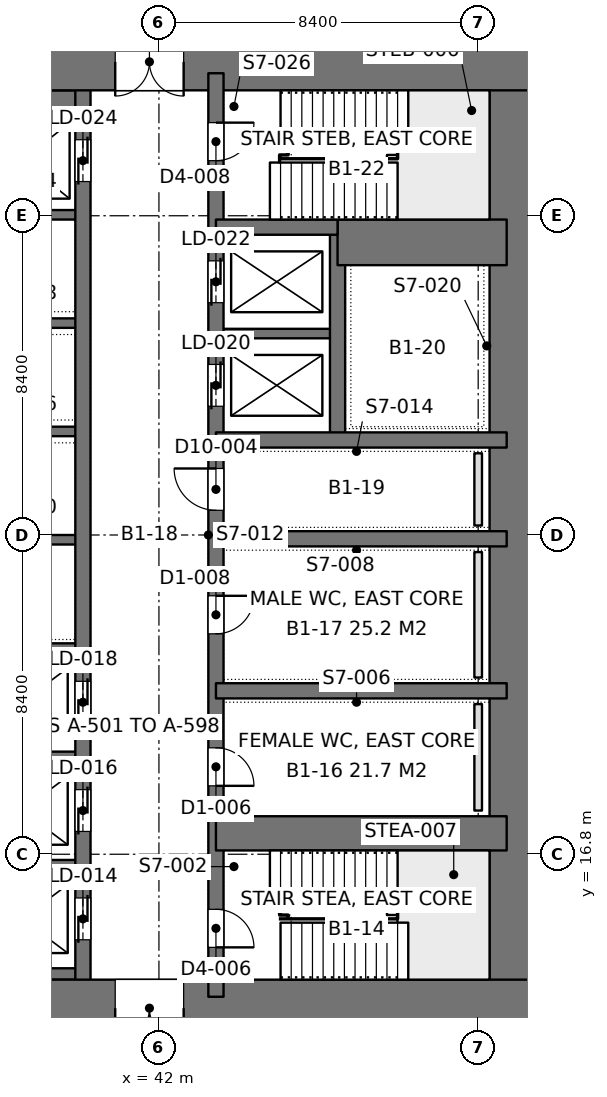
"""IFC4 building model, lengths in metres.
Left out: names, types, materials, properties, quantities, classifications, styles, units other than length and angle.
Written with IfcOpenShell. Run it as: python <this file> out.ifc"""

import sys

from ifc_helpers import new_model, si_unit, direction, frame, frame_2d, origin, place, context, subcontext, project, spatial, rectangle, extrude, element, fill, save


model = new_model("IFC4")
c1 = context("Model", 3, precision=1e-05, world=origin(), true_north=direction((0.0, 1.0)))
c2 = subcontext(c1, "Body", "Model", "MODEL_VIEW")
j1 = project(units=[si_unit("LENGTHUNIT", "METRE"), si_unit("PLANEANGLEUNIT", "RADIAN")], contexts=[c1])
p1 = place(None, origin())
s1 = spatial("IfcSite", under=j1, at=p1, CompositionType="ELEMENT")
p2 = place(p1, origin())
s2 = spatial("IfcBuilding", under=s1, at=p2, CompositionType="ELEMENT")
p3 = place(p2, frame((0.0, 0.0, -4.2)))
s3 = spatial("IfcBuildingStorey", under=s2, at=p3, CompositionType="ELEMENT", Elevation=-4.2)
p4 = place(p3, frame((33.0, 12.75, 0.0), z_axis=(0.0, 0.0, 1.0), x_axis=(1.0, 0.0, 0.0)))
e1 = element("IfcWall", 1, at=p4, inside=s3, PredefinedType="SHEAR", context=c2, shape_type="SweptSolid", body=[
    extrude(rectangle(XDim=19.2, YDim=1.5, at=frame_2d((9.6, 0.0))), origin(), (0.0, 0.0, 1.0), 4.2),
])
p5 = place(p4, frame((7.85, 0.0, 0.0)))
e2 = element("IfcOpeningElement", 2, at=p5, cuts=e1, PredefinedType="OPENING", context=c2, shape_type="SweptSolid", body=[
    extrude(rectangle(XDim=1.8, YDim=2.4, at=frame_2d((0.9, 1.2))), frame((0.0, 0.76, 0.0), z_axis=(0.0, -1.0, 0.0), x_axis=(1.0, 0.0, 0.0)), (0.0, 0.0, 1.0), 1.52),
])
p6 = place(p3, frame((33.0, 37.65, 0.0), z_axis=(0.0, 0.0, 1.0), x_axis=(1.0, 0.0, 0.0)))
e3 = element("IfcWall", 3, at=p6, inside=s3, PredefinedType="SHEAR", context=c2, shape_type="SweptSolid", body=[
    extrude(rectangle(XDim=19.2, YDim=1.5, at=frame_2d((9.6, 0.0))), origin(), (0.0, 0.0, 1.0), 4.2),
])
p7 = place(p6, frame((7.85, 0.0, 0.0)))
e4 = element("IfcOpeningElement", 4, at=p7, cuts=e3, PredefinedType="OPENING", context=c2, shape_type="SweptSolid", body=[
    extrude(rectangle(XDim=1.8, YDim=2.4, at=frame_2d((0.9, 1.2))), frame((0.0, 0.76, 0.0), z_axis=(0.0, -1.0, 0.0), x_axis=(1.0, 0.0, 0.0)), (0.0, 0.0, 1.0), 1.52),
])
p8 = place(p3, frame((51.45, 12.75, 0.0), z_axis=(0.0, 0.0, 1.0), x_axis=(0.0, 1.0, 0.0)))
e5 = element("IfcWall", 5, at=p8, inside=s3, PredefinedType="SHEAR", context=c2, shape_type="SweptSolid", body=[
    extrude(rectangle(XDim=24.9, YDim=1.5, at=frame_2d((12.45, 0.0))), origin(), (0.0, 0.0, 1.0), 4.2),
])
p9 = place(p3, frame((43.5, 13.05, 0.0), z_axis=(0.0, 0.0, 1.0), x_axis=(0.0, 1.0, 0.0)))
e6 = element("IfcWall", 6, at=p9, inside=s3, PredefinedType="SHEAR", context=c2, shape_type="SweptSolid", body=[
    extrude(rectangle(XDim=24.3, YDim=0.4, at=frame_2d((12.15, 0.0))), origin(), (0.0, 0.0, 1.0), 4.2),
])
p10 = place(p9, frame((1.3, 0.0, 0.0)))
e7 = element("IfcOpeningElement", 7, at=p10, cuts=e6, PredefinedType="OPENING", context=c2, shape_type="SweptSolid", body=[
    extrude(rectangle(XDim=1.0, YDim=2.2, at=frame_2d((0.5, 1.1))), frame((0.0, 0.21, 0.0), z_axis=(0.0, -1.0, 0.0), x_axis=(1.0, 0.0, 0.0)), (0.0, 0.0, 1.0), 0.42),
])
p11 = place(p9, frame((22.0, 0.0, 0.0)))
e8 = element("IfcOpeningElement", 8, at=p11, cuts=e6, PredefinedType="OPENING", context=c2, shape_type="SweptSolid", body=[
    extrude(rectangle(XDim=1.0, YDim=2.2, at=frame_2d((0.5, 1.1))), frame((0.0, 0.21, 0.0), z_axis=(0.0, -1.0, 0.0), x_axis=(1.0, 0.0, 0.0)), (0.0, 0.0, 1.0), 0.42),
])
p12 = place(p9, frame((5.55, 0.0, 0.0)))
e9 = element("IfcOpeningElement", 9, at=p12, cuts=e6, PredefinedType="OPENING", context=c2, shape_type="SweptSolid", body=[
    extrude(rectangle(XDim=1.0, YDim=2.2, at=frame_2d((0.5, 1.1))), frame((0.0, 0.21, 0.0), z_axis=(0.0, -1.0, 0.0), x_axis=(1.0, 0.0, 0.0)), (0.0, 0.0, 1.0), 0.42),
])
p13 = place(p9, frame((9.55, 0.0, 0.0)))
e10 = element("IfcOpeningElement", 10, at=p13, cuts=e6, PredefinedType="OPENING", context=c2, shape_type="SweptSolid", body=[
    extrude(rectangle(XDim=1.0, YDim=2.2, at=frame_2d((0.5, 1.1))), frame((0.0, 0.21, 0.0), z_axis=(0.0, -1.0, 0.0), x_axis=(1.0, 0.0, 0.0)), (0.0, 0.0, 1.0), 0.42),
])
p14 = place(p9, frame((12.8, 0.0, 0.0)))
e11 = element("IfcOpeningElement", 11, at=p14, cuts=e6, PredefinedType="OPENING", context=c2, shape_type="SweptSolid", body=[
    extrude(rectangle(XDim=1.1, YDim=2.2, at=frame_2d((0.55, 1.1))), frame((0.0, 0.21, 0.0), z_axis=(0.0, -1.0, 0.0), x_axis=(1.0, 0.0, 0.0)), (0.0, 0.0, 1.0), 0.42),
])
p15 = place(p9, frame((15.538, 0.0, 0.0)))
e12 = element("IfcOpeningElement", 12, at=p15, cuts=e6, PredefinedType="OPENING", context=c2, shape_type="SweptSolid", body=[
    extrude(rectangle(XDim=1.1, YDim=2.2, at=frame_2d((0.55, 1.1))), frame((0.0, 0.21, 0.0), z_axis=(0.0, -1.0, 0.0), x_axis=(1.0, 0.0, 0.0)), (0.0, 0.0, 1.0), 0.42),
])
p16 = place(p9, frame((18.262, 0.0, 0.0)))
e13 = element("IfcOpeningElement", 13, at=p16, cuts=e6, PredefinedType="OPENING", context=c2, shape_type="SweptSolid", body=[
    extrude(rectangle(XDim=1.1, YDim=2.2, at=frame_2d((0.55, 1.1))), frame((0.0, 0.21, 0.0), z_axis=(0.0, -1.0, 0.0), x_axis=(1.0, 0.0, 0.0)), (0.0, 0.0, 1.0), 0.42),
])
p17 = place(p3, frame((40.0, 13.05, 0.0), z_axis=(0.0, 0.0, 1.0), x_axis=(0.0, 1.0, 0.0)))
e14 = element("IfcWall", 14, at=p17, inside=s3, PredefinedType="SHEAR", context=c2, shape_type="SweptSolid", body=[
    extrude(rectangle(XDim=24.3, YDim=0.4, at=frame_2d((12.15, 0.0))), origin(), (0.0, 0.0, 1.0), 4.2),
])
p18 = place(p17, frame((1.5, 0.0, 0.0)))
e15 = element("IfcOpeningElement", 15, at=p18, cuts=e14, PredefinedType="OPENING", context=c2, shape_type="SweptSolid", body=[
    extrude(rectangle(XDim=1.1, YDim=2.2, at=frame_2d((0.55, 1.1))), frame((0.0, 0.21, 0.0), z_axis=(0.0, -1.0, 0.0), x_axis=(1.0, 0.0, 0.0)), (0.0, 0.0, 1.0), 0.42),
])
p19 = place(p17, frame((4.35, 0.0, 0.0)))
e16 = element("IfcOpeningElement", 16, at=p19, cuts=e14, PredefinedType="OPENING", context=c2, shape_type="SweptSolid", body=[
    extrude(rectangle(XDim=1.1, YDim=2.2, at=frame_2d((0.55, 1.1))), frame((0.0, 0.21, 0.0), z_axis=(0.0, -1.0, 0.0), x_axis=(1.0, 0.0, 0.0)), (0.0, 0.0, 1.0), 0.42),
])
p20 = place(p17, frame((7.2, 0.0, 0.0)))
e17 = element("IfcOpeningElement", 17, at=p20, cuts=e14, PredefinedType="OPENING", context=c2, shape_type="SweptSolid", body=[
    extrude(rectangle(XDim=1.1, YDim=2.2, at=frame_2d((0.55, 1.1))), frame((0.0, 0.21, 0.0), z_axis=(0.0, -1.0, 0.0), x_axis=(1.0, 0.0, 0.0)), (0.0, 0.0, 1.0), 0.42),
])
p21 = place(p17, frame((21.45, 0.0, 0.0)))
e18 = element("IfcOpeningElement", 18, at=p21, cuts=e14, PredefinedType="OPENING", context=c2, shape_type="SweptSolid", body=[
    extrude(rectangle(XDim=1.1, YDim=2.2, at=frame_2d((0.55, 1.1))), frame((0.0, 0.21, 0.0), z_axis=(0.0, -1.0, 0.0), x_axis=(1.0, 0.0, 0.0)), (0.0, 0.0, 1.0), 0.42),
])
p22 = place(p3, frame((51.15, 17.35, 0.0), z_axis=(0.0, 0.0, 1.0), x_axis=(-1.0, 0.0, 0.0)))
e19 = element("IfcWall", 19, at=p22, inside=s3, PredefinedType="SHEAR", context=c2, shape_type="SweptSolid", body=[
    extrude(rectangle(XDim=7.65, YDim=0.9, at=frame_2d((3.825, 0.0))), origin(), (0.0, 0.0, 1.0), 4.2),
])
for number, where, z_axis, x_axis in (
    (20, (51.15, 21.1, 0.0), (0.0, 0.0, 1.0), (-1.0, 0.0, 0.0)),
    (21, (51.15, 25.1, 0.0), (0.0, 0.0, 1.0), (-1.0, 0.0, 0.0)),
    (22, (51.15, 27.7, 0.0), (0.0, 0.0, 1.0), (-1.0, 0.0, 0.0)),
):
    element("IfcWall", number, at=place(p3, frame(where, z_axis=z_axis, x_axis=x_axis)), inside=s3, PredefinedType="SHEAR", context=c2, shape_type="SweptSolid", body=[
        extrude(rectangle(XDim=7.65, YDim=0.4, at=frame_2d((3.825, 0.0))), origin(), (0.0, 0.0, 1.0), 4.2),
    ])
p23 = place(p3, frame((51.15, 32.9, 0.0), z_axis=(0.0, 0.0, 1.0), x_axis=(-1.0, 0.0, 0.0)))
e23 = element("IfcWall", 23, at=p23, inside=s3, PredefinedType="SHEAR", context=c2, shape_type="SweptSolid", body=[
    extrude(rectangle(XDim=4.45, YDim=1.2, at=frame_2d((2.225, 0.0))), origin(), (0.0, 0.0, 1.0), 4.2),
])
p24 = place(p3, frame((46.7, 33.3, 0.0), z_axis=(0.0, 0.0, 1.0), x_axis=(-1.0, 0.0, 0.0)))
e24 = element("IfcWall", 24, at=p24, inside=s3, PredefinedType="SHEAR", context=c2, shape_type="SweptSolid", body=[
    extrude(rectangle(XDim=3.2, YDim=0.4, at=frame_2d((1.6, 0.0))), origin(), (0.0, 0.0, 1.0), 4.2),
])
p25 = place(p3, frame((46.7, 27.7, 0.0), z_axis=(0.0, 0.0, 1.0), x_axis=(0.0, 1.0, 0.0)))
e25 = element("IfcWall", 25, at=p25, inside=s3, PredefinedType="SHEAR", context=c2, shape_type="SweptSolid", body=[
    extrude(rectangle(XDim=5.6, YDim=0.4, at=frame_2d((2.8, 0.0))), origin(), (0.0, 0.0, 1.0), 4.2),
])
p26 = place(p3, frame((46.7, 30.5, 0.0), z_axis=(0.0, 0.0, 1.0), x_axis=(-1.0, 0.0, 0.0)))
e26 = element("IfcWall", 26, at=p26, inside=s3, PredefinedType="SHEAR", context=c2, shape_type="SweptSolid", body=[
    extrude(rectangle(XDim=3.2, YDim=0.25, at=frame_2d((1.6, 0.0))), origin(), (0.0, 0.0, 1.0), 4.2),
])
p27 = place(p3, frame((40.0, 13.65, 0.0), z_axis=(0.0, 0.0, 1.0), x_axis=(-1.0, 0.0, 0.0)))
e27 = element("IfcWall", 27, at=p27, inside=s3, PredefinedType="SHEAR", context=c2, shape_type="SweptSolid", body=[
    extrude(rectangle(XDim=3.2, YDim=0.3, at=frame_2d((1.6, 0.0))), origin(), (0.0, 0.0, 1.0), 4.2),
])
for number, where, z_axis, x_axis in (
    (28, (40.0, 16.525, 0.0), (0.0, 0.0, 1.0), (-1.0, 0.0, 0.0)),
    (29, (40.0, 19.375, 0.0), (0.0, 0.0, 1.0), (-1.0, 0.0, 0.0)),
    (30, (40.0, 22.225, 0.0), (0.0, 0.0, 1.0), (-1.0, 0.0, 0.0)),
    (31, (40.0, 25.075, 0.0), (0.0, 0.0, 1.0), (-1.0, 0.0, 0.0)),
    (32, (40.0, 27.925, 0.0), (0.0, 0.0, 1.0), (-1.0, 0.0, 0.0)),
    (33, (40.0, 30.775, 0.0), (0.0, 0.0, 1.0), (-1.0, 0.0, 0.0)),
    (34, (40.0, 33.625, 0.0), (0.0, 0.0, 1.0), (-1.0, 0.0, 0.0)),
):
    element("IfcWall", number, at=place(p3, frame(where, z_axis=z_axis, x_axis=x_axis)), inside=s3, PredefinedType="SHEAR", context=c2, shape_type="SweptSolid", body=[
        extrude(rectangle(XDim=3.2, YDim=0.25, at=frame_2d((1.6, 0.0))), origin(), (0.0, 0.0, 1.0), 4.2),
    ])
p28 = place(p3, frame((40.0, 36.625, 0.0), z_axis=(0.0, 0.0, 1.0), x_axis=(-1.0, 0.0, 0.0)))
e35 = element("IfcWall", 35, at=p28, inside=s3, PredefinedType="SHEAR", context=c2, shape_type="SweptSolid", body=[
    extrude(rectangle(XDim=3.2, YDim=0.55, at=frame_2d((1.6, 0.0))), origin(), (0.0, 0.0, 1.0), 4.2),
])
p29 = place(p3, frame((51.15, 9.049, 0.0), z_axis=(0.0, 0.0, 1.0), x_axis=(0.0, 1.0, 0.0)))
e36 = element("IfcWall", 36, at=p29, inside=s3, PredefinedType="PARTITIONING", context=c2, shape_type="SweptSolid", body=[
    extrude(rectangle(XDim=3.531, YDim=0.25, at=frame_2d((1.766, 0.0))), origin(), (0.0, 0.0, 1.0), 3.8),
])
p30 = place(p29, frame((1.001, 0.0, 0.0)))
e37 = element("IfcOpeningElement", 37, at=p30, cuts=e36, PredefinedType="OPENING", context=c2, shape_type="SweptSolid", body=[
    extrude(rectangle(XDim=0.9, YDim=2.2, at=frame_2d((0.45, 1.1))), frame((0.0, 0.135, 0.0), z_axis=(0.0, -1.0, 0.0), x_axis=(1.0, 0.0, 0.0)), (0.0, 0.0, 1.0), 0.27),
])
p31 = place(p3, frame((51.15, 37.82, 0.0), z_axis=(0.0, 0.0, 1.0), x_axis=(0.0, 1.0, 0.0)))
e38 = element("IfcWall", 38, at=p31, inside=s3, PredefinedType="PARTITIONING", context=c2, shape_type="SweptSolid", body=[
    extrude(rectangle(XDim=3.531, YDim=0.25, at=frame_2d((1.766, 0.0))), origin(), (0.0, 0.0, 1.0), 3.8),
])
p32 = place(p3, frame((50.4, 17.95, 0.0), z_axis=(0.0, 0.0, 1.0), x_axis=(0.0, 1.0, 0.0)))
e39 = element("IfcWall", 39, at=p32, inside=s3, PredefinedType="PLUMBINGWALL", context=c2, shape_type="SweptSolid", body=[
    extrude(rectangle(XDim=2.8, YDim=0.2, at=frame_2d((1.4, 0.0))), origin(), (0.0, 0.0, 1.0), 1.2),
])
p33 = place(p3, frame((50.4, 21.45, 0.0), z_axis=(0.0, 0.0, 1.0), x_axis=(0.0, 1.0, 0.0)))
e40 = element("IfcWall", 40, at=p33, inside=s3, PredefinedType="PLUMBINGWALL", context=c2, shape_type="SweptSolid", body=[
    extrude(rectangle(XDim=3.3, YDim=0.2, at=frame_2d((1.65, 0.0))), origin(), (0.0, 0.0, 1.0), 1.2),
])
p34 = place(p3, frame((50.4, 25.45, 0.0), z_axis=(0.0, 0.0, 1.0), x_axis=(0.0, 1.0, 0.0)))
e41 = element("IfcWall", 41, at=p34, inside=s3, PredefinedType="PLUMBINGWALL", context=c2, shape_type="SweptSolid", body=[
    extrude(rectangle(XDim=1.9, YDim=0.2, at=frame_2d((0.95, 0.0))), origin(), (0.0, 0.0, 1.0), 1.2),
])
p35 = place(p5, frame((1.8, 0.0, 0.0), z_axis=(0.0, 0.0, 1.0), x_axis=(-1.0, 0.0, 0.0)))
e42 = element("IfcDoor", 42, at=p35, inside=s3, OperationType="DOUBLE_DOOR_SINGLE_SWING", PredefinedType="DOOR", context=c2, shape_type="SweptSolid", body=[
    extrude(rectangle(XDim=1.8, YDim=2.4, at=frame_2d((0.9, 1.2))), frame((0.0, 0.025, 0.0), z_axis=(0.0, -1.0, 0.0), x_axis=(1.0, 0.0, 0.0)), (0.0, 0.0, 1.0), 0.05),
])
fill(e2, e42)
p36 = place(p7, frame((1.8, 0.0, 0.0), z_axis=(0.0, 0.0, 1.0), x_axis=(-1.0, 0.0, 0.0)))
e43 = element("IfcDoor", 43, at=p36, inside=s3, OperationType="DOUBLE_DOOR_SINGLE_SWING", PredefinedType="DOOR", context=c2, shape_type="SweptSolid", body=[
    extrude(rectangle(XDim=1.8, YDim=2.4, at=frame_2d((0.9, 1.2))), frame((0.0, 0.025, 0.0), z_axis=(0.0, -1.0, 0.0), x_axis=(1.0, 0.0, 0.0)), (0.0, 0.0, 1.0), 0.05),
])
fill(e4, e43)
p37 = place(p10, frame((1.0, 0.0, 0.0), z_axis=(0.0, 0.0, 1.0), x_axis=(-1.0, 0.0, 0.0)))
e44 = element("IfcDoor", 44, at=p37, inside=s3, OperationType="SINGLE_SWING_RIGHT", PredefinedType="DOOR", context=c2, shape_type="SweptSolid", body=[
    extrude(rectangle(XDim=1.0, YDim=2.2, at=frame_2d((0.5, 1.1))), frame((0.0, 0.025, 0.0), z_axis=(0.0, -1.0, 0.0), x_axis=(1.0, 0.0, 0.0)), (0.0, 0.0, 1.0), 0.05),
])
fill(e7, e44)
p38 = place(p11, frame((1.0, 0.0, 0.0), z_axis=(0.0, 0.0, 1.0), x_axis=(-1.0, 0.0, 0.0)))
e45 = element("IfcDoor", 45, at=p38, inside=s3, OperationType="SINGLE_SWING_LEFT", PredefinedType="DOOR", context=c2, shape_type="SweptSolid", body=[
    extrude(rectangle(XDim=1.0, YDim=2.2, at=frame_2d((0.5, 1.1))), frame((0.0, 0.025, 0.0), z_axis=(0.0, -1.0, 0.0), x_axis=(1.0, 0.0, 0.0)), (0.0, 0.0, 1.0), 0.05),
])
fill(e8, e45)
p39 = place(p12, frame((1.0, 0.0, 0.0), z_axis=(0.0, 0.0, 1.0), x_axis=(-1.0, 0.0, 0.0)))
e46 = element("IfcDoor", 46, at=p39, inside=s3, OperationType="SINGLE_SWING_RIGHT", PredefinedType="DOOR", context=c2, shape_type="SweptSolid", body=[
    extrude(rectangle(XDim=1.0, YDim=2.2, at=frame_2d((0.5, 1.1))), frame((0.0, 0.025, 0.0), z_axis=(0.0, -1.0, 0.0), x_axis=(1.0, 0.0, 0.0)), (0.0, 0.0, 1.0), 0.05),
])
fill(e9, e46)
p40 = place(p13, frame((1.0, 0.0, 0.0), z_axis=(0.0, 0.0, 1.0), x_axis=(-1.0, 0.0, 0.0)))
e47 = element("IfcDoor", 47, at=p40, inside=s3, OperationType="SINGLE_SWING_LEFT", PredefinedType="DOOR", context=c2, shape_type="SweptSolid", body=[
    extrude(rectangle(XDim=1.0, YDim=2.2, at=frame_2d((0.5, 1.1))), frame((0.0, 0.025, 0.0), z_axis=(0.0, -1.0, 0.0), x_axis=(1.0, 0.0, 0.0)), (0.0, 0.0, 1.0), 0.05),
])
fill(e10, e47)
p41 = place(p14, origin())
e48 = element("IfcDoor", 48, at=p41, inside=s3, OperationType="SINGLE_SWING_RIGHT", PredefinedType="DOOR", context=c2, shape_type="SweptSolid", body=[
    extrude(rectangle(XDim=1.1, YDim=2.2, at=frame_2d((0.55, 1.1))), frame((0.0, 0.025, 0.0), z_axis=(0.0, -1.0, 0.0), x_axis=(1.0, 0.0, 0.0)), (0.0, 0.0, 1.0), 0.05),
])
fill(e11, e48)
p42 = place(p18, origin())
e49 = element("IfcDoor", 49, at=p42, inside=s3, OperationType="DOUBLE_DOOR_SLIDING", PredefinedType="DOOR", context=c2, shape_type="SweptSolid", body=[
    extrude(rectangle(XDim=1.1, YDim=2.2, at=frame_2d((0.55, 1.1))), frame((0.0, 0.025, 0.0), z_axis=(0.0, -1.0, 0.0), x_axis=(1.0, 0.0, 0.0)), (0.0, 0.0, 1.0), 0.05),
])
fill(e15, e49)
p43 = place(p19, origin())
e50 = element("IfcDoor", 50, at=p43, inside=s3, OperationType="DOUBLE_DOOR_SLIDING", PredefinedType="DOOR", context=c2, shape_type="SweptSolid", body=[
    extrude(rectangle(XDim=1.1, YDim=2.2, at=frame_2d((0.55, 1.1))), frame((0.0, 0.025, 0.0), z_axis=(0.0, -1.0, 0.0), x_axis=(1.0, 0.0, 0.0)), (0.0, 0.0, 1.0), 0.05),
])
fill(e16, e50)
p44 = place(p20, origin())
e51 = element("IfcDoor", 51, at=p44, inside=s3, OperationType="DOUBLE_DOOR_SLIDING", PredefinedType="DOOR", context=c2, shape_type="SweptSolid", body=[
    extrude(rectangle(XDim=1.1, YDim=2.2, at=frame_2d((0.55, 1.1))), frame((0.0, 0.025, 0.0), z_axis=(0.0, -1.0, 0.0), x_axis=(1.0, 0.0, 0.0)), (0.0, 0.0, 1.0), 0.05),
])
fill(e17, e51)
p45 = place(p21, origin())
e52 = element("IfcDoor", 52, at=p45, inside=s3, OperationType="DOUBLE_DOOR_SLIDING", PredefinedType="DOOR", context=c2, shape_type="SweptSolid", body=[
    extrude(rectangle(XDim=1.1, YDim=2.2, at=frame_2d((0.55, 1.1))), frame((0.0, 0.025, 0.0), z_axis=(0.0, -1.0, 0.0), x_axis=(1.0, 0.0, 0.0)), (0.0, 0.0, 1.0), 0.05),
])
fill(e18, e52)
p46 = place(p15, origin())
e53 = element("IfcDoor", 53, at=p46, inside=s3, OperationType="DOUBLE_DOOR_SLIDING", PredefinedType="DOOR", context=c2, shape_type="SweptSolid", body=[
    extrude(rectangle(XDim=1.1, YDim=2.2, at=frame_2d((0.55, 1.1))), frame((0.0, 0.025, 0.0), z_axis=(0.0, -1.0, 0.0), x_axis=(1.0, 0.0, 0.0)), (0.0, 0.0, 1.0), 0.05),
])
fill(e12, e53)
p47 = place(p16, origin())
e54 = element("IfcDoor", 54, at=p47, inside=s3, OperationType="DOUBLE_DOOR_SLIDING", PredefinedType="DOOR", context=c2, shape_type="SweptSolid", body=[
    extrude(rectangle(XDim=1.1, YDim=2.2, at=frame_2d((0.55, 1.1))), frame((0.0, 0.025, 0.0), z_axis=(0.0, -1.0, 0.0), x_axis=(1.0, 0.0, 0.0)), (0.0, 0.0, 1.0), 0.05),
])
fill(e13, e54)
save(model, sys.argv[1])
